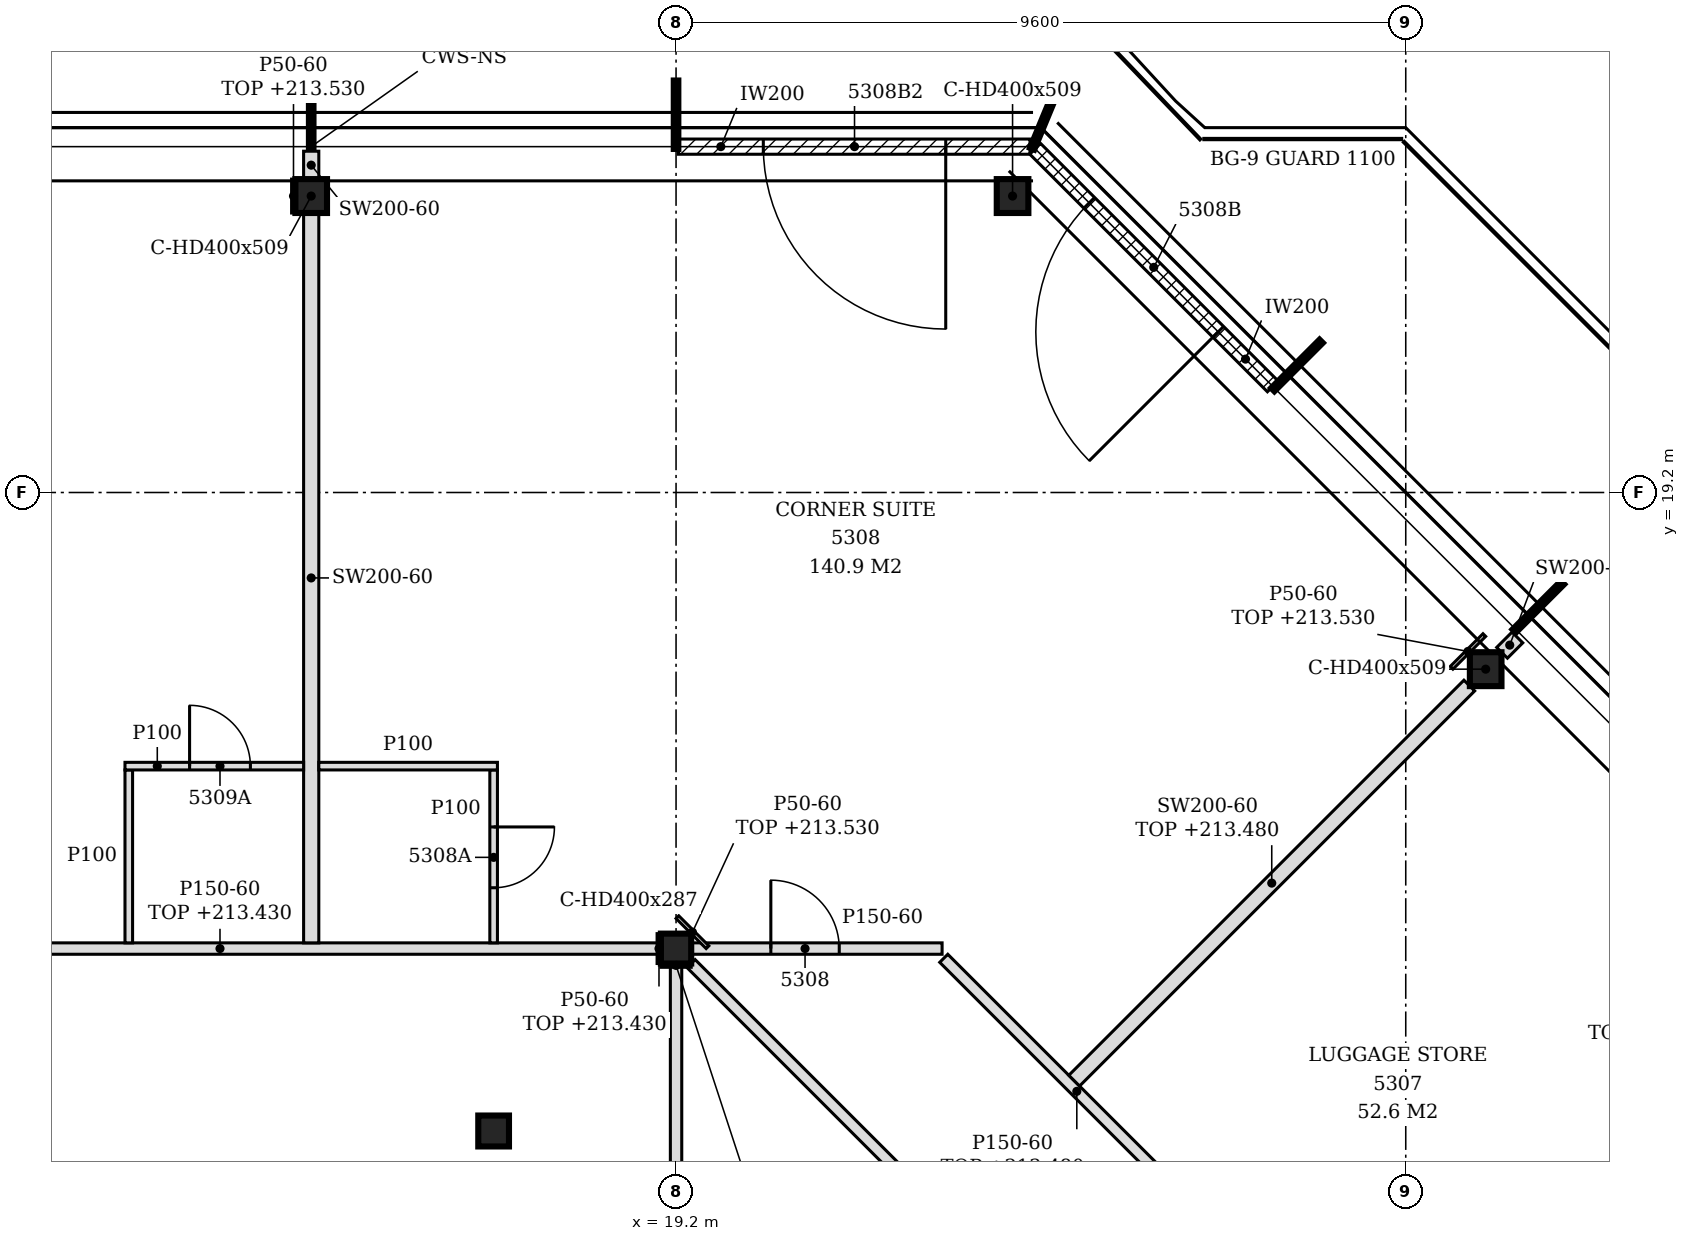
"""IFC4 building model, lengths in metres.
Left out: names, types, materials, properties, quantities, classifications, styles, units other than length and angle.
Written with IfcOpenShell. Run it as: python <this file> out.ifc"""

import sys

from ifc_helpers import new_model, si_unit, direction, frame, frame_2d, origin, origin_2d, place, context, subcontext, project, spatial, polyline, rectangle, i_section, outline, extrude, element, fill, save


model = new_model("IFC4")
c1 = context("Model", 3, precision=1e-05, world=origin(), true_north=direction((0.0, 1.0)))
c2 = subcontext(c1, "Body", "Model", "MODEL_VIEW")
j1 = project(units=[si_unit("LENGTHUNIT", "METRE"), si_unit("PLANEANGLEUNIT", "RADIAN")], contexts=[c1])
p1 = place(None, origin())
s1 = spatial("IfcSite", under=j1, at=p1, CompositionType="ELEMENT")
p2 = place(p1, origin())
s2 = spatial("IfcBuilding", under=s1, at=p2, CompositionType="ELEMENT")
p3 = place(p2, frame((0.0, 0.0, 210.6)))
s3 = spatial("IfcBuildingStorey", under=s2, at=p3, CompositionType="ELEMENT", Elevation=210.6)
for number, where, z_axis, x_axis in (
    (1, (29.852, 16.876, -0.15), (0.0, 0.0, 1.0), (1.0, 0.0, 0.0)),
    (2, (23.627, 23.1, -0.15), (0.0, 0.0, 1.0), (1.0, 0.0, 0.0)),
    (3, (14.4, 23.1, -0.15), (0.0, 0.0, 1.0), (1.0, 0.0, 0.0)),
):
    element("IfcColumn", number, at=place(p3, frame(where, z_axis=z_axis, x_axis=x_axis)), inside=s3, PredefinedType="COLUMN", context=c2, shape_type="SweptSolid", body=[
        extrude(i_section(OverallWidth=0.416, OverallDepth=0.446, WebThickness=0.039, FlangeThickness=0.063, FilletRadius=0.015, at=origin_2d()), origin(), (0.0, 0.0, 1.0), 3.6),
    ])
p4 = place(p3, frame((19.2, 13.2, -0.15), z_axis=(0.0, 0.0, 1.0), x_axis=(1.0, 0.0, 0.0)))
e4 = element("IfcColumn", 4, at=p4, inside=s3, PredefinedType="COLUMN", context=c2, shape_type="SweptSolid", body=[
    extrude(i_section(OverallWidth=0.399, OverallDepth=0.393, WebThickness=0.023, FlangeThickness=0.037, FilletRadius=0.015, at=origin_2d()), origin(), (0.0, 0.0, 1.0), 3.6),
])
p5 = place(p3, frame((16.8, 10.8, -0.15), z_axis=(0.0, 0.0, 1.0), x_axis=(1.0, 0.0, 0.0)))
e5 = element("IfcColumn", 5, at=p5, inside=s3, PredefinedType="COLUMN", context=c2, shape_type="SweptSolid", body=[
    extrude(i_section(OverallWidth=0.404, OverallDepth=0.407, WebThickness=0.027, FlangeThickness=0.044, FilletRadius=0.015, at=origin_2d()), origin(), (0.0, 0.0, 1.0), 3.6),
])
p6 = place(p3, frame((27.051, 20.596, 0.0), z_axis=(0.0, 0.0, 1.0), x_axis=(-0.707106781187, 0.707106781187, 0.0)))
e6 = element("IfcWall", 6, at=p6, inside=s3, PredefinedType="NOTDEFINED", context=c2, shape_type="SweptSolid", body=[
    extrude(rectangle(XDim=4.421, YDim=0.2, at=frame_2d((2.21, 0.0))), origin(), (0.0, 0.0, 1.0), 3.45),
])
p7 = place(p6, frame((1.015, 0.0, 0.0)))
e7 = element("IfcOpeningElement", 7, at=p7, cuts=e6, PredefinedType="OPENING", context=c2, shape_type="SweptSolid", body=[
    extrude(rectangle(XDim=2.4, YDim=2.4, at=frame_2d((1.2, 1.2))), frame((0.0, 0.11, 0.0), z_axis=(0.0, -1.0, 0.0), x_axis=(1.0, 0.0, 0.0)), (0.0, 0.0, 1.0), 0.22),
])
p8 = place(p3, frame((23.856, 23.75, 0.0), z_axis=(0.0, 0.0, 1.0), x_axis=(-1.0, 0.0, 0.0)))
e8 = element("IfcWall", 8, at=p8, inside=s3, PredefinedType="NOTDEFINED", context=c2, shape_type="SweptSolid", body=[
    extrude(rectangle(XDim=4.626, YDim=0.2, at=frame_2d((2.313, 0.0))), origin(), (0.0, 0.0, 1.0), 3.45),
])
p9 = place(p8, frame((1.108, 0.0, 0.0)))
e9 = element("IfcOpeningElement", 9, at=p9, cuts=e8, PredefinedType="OPENING", context=c2, shape_type="SweptSolid", body=[
    extrude(rectangle(XDim=2.4, YDim=2.4, at=frame_2d((1.2, 1.2))), frame((0.0, 0.11, 0.0), z_axis=(0.0, -1.0, 0.0), x_axis=(1.0, 0.0, 0.0)), (0.0, 0.0, 1.0), 0.22),
])
p10 = place(p3, frame((35.872, -0.078, 0.0), z_axis=(0.0, 0.0, 1.0), x_axis=(-0.707113345155, 0.707100217157, 0.0)))
e10 = element("IfcWall", 10, at=p10, inside=s3, PredefinedType="PARTITIONING", context=c2, shape_type="SweptSolid", body=[
    extrude(rectangle(XDim=18.597, YDim=0.15, at=frame_2d((9.298, 0.0))), origin(), (0.0, 0.0, 1.0), 2.88),
])
p11 = place(p10, frame((4.744, 0.0, 0.0)))
e11 = element("IfcOpeningElement", 11, at=p11, cuts=e10, PredefinedType="OPENING", context=c2, shape_type="SweptSolid", body=[
    extrude(rectangle(XDim=0.9, YDim=2.1, at=frame_2d((0.45, 1.05))), frame((0.0, 0.085, 0.0), z_axis=(0.0, -1.0, 0.0), x_axis=(1.0, 0.0, 0.0)), (0.0, 0.0, 1.0), 0.17),
])
p12 = place(p10, frame((8.345, 0.0, 0.0)))
e12 = element("IfcOpeningElement", 12, at=p12, cuts=e10, PredefinedType="OPENING", context=c2, shape_type="SweptSolid", body=[
    extrude(rectangle(XDim=0.9, YDim=2.1, at=frame_2d((0.45, 1.05))), frame((0.0, 0.085, 0.0), z_axis=(0.0, -1.0, 0.0), x_axis=(1.0, 0.0, 0.0)), (0.0, 0.0, 1.0), 0.17),
])
p13 = place(p10, frame((12.746, 0.0, 0.0)))
e13 = element("IfcOpeningElement", 13, at=p13, cuts=e10, PredefinedType="OPENING", context=c2, shape_type="SweptSolid", body=[
    extrude(rectangle(XDim=0.9, YDim=2.1, at=frame_2d((0.45, 1.05))), frame((0.0, 0.085, 0.0), z_axis=(0.0, -1.0, 0.0), x_axis=(1.0, 0.0, 0.0)), (0.0, 0.0, 1.0), 0.17),
])
p14 = place(p3, frame((32.272, 0.128, 0.0), z_axis=(0.0, 0.0, 1.0), x_axis=(-0.707106781187, 0.707106781187, 0.0)))
e14 = element("IfcWall", 14, at=p14, inside=s3, PredefinedType="PARTITIONING", context=c2, shape_type="SweptSolid", body=[
    extrude(rectangle(XDim=18.207, YDim=0.15, at=frame_2d((9.103, 0.0))), origin(), (0.0, 0.0, 1.0), 2.88),
])
p15 = place(p14, frame((8.703, 0.0, 0.0)))
e15 = element("IfcOpeningElement", 15, at=p15, cuts=e14, PredefinedType="OPENING", context=c2, shape_type="SweptSolid", body=[
    extrude(rectangle(XDim=0.9, YDim=2.1, at=frame_2d((0.45, 1.05))), frame((0.0, 0.085, 0.0), z_axis=(0.0, -1.0, 0.0), x_axis=(1.0, 0.0, 0.0)), (0.0, 0.0, 1.0), 0.17),
])
p16 = place(p3, frame((19.2, 2.596, 0.0), z_axis=(0.0, 0.0, 1.0), x_axis=(0.0, 1.0, 0.0)))
e16 = element("IfcWall", 16, at=p16, inside=s3, PredefinedType="PARTITIONING", context=c2, shape_type="SweptSolid", body=[
    extrude(rectangle(XDim=10.407, YDim=0.15, at=frame_2d((5.204, 0.0))), origin(), (0.0, 0.0, 1.0), 2.83),
])
p17 = place(p3, frame((30.662, 5.238, 0.0), z_axis=(0.0, 0.0, 1.0), x_axis=(0.707106781187, 0.707106781187, 0.0)))
e17 = element("IfcWall", 17, at=p17, inside=s3, PredefinedType="PARTITIONING", context=c2, shape_type="SweptSolid", body=[
    extrude(rectangle(XDim=7.351, YDim=0.2, at=frame_2d((3.676, 0.0))), origin(), (0.0, 0.0, 1.0), 2.93),
])
p18 = place(p3, frame((31.398, 9.798, 0.0), z_axis=(0.0, 0.0, 1.0), x_axis=(0.707133900936, 0.707079660397, 0.0)))
e18 = element("IfcWall", 18, at=p18, inside=s3, PredefinedType="PARTITIONING", context=c2, shape_type="SweptSolid", body=[
    extrude(rectangle(XDim=4.501, YDim=0.2, at=frame_2d((2.25, 0.0))), origin(), (0.0, 0.0, 1.0), 2.63),
])
p19 = place(p3, frame((24.438, 11.462, 0.0), z_axis=(0.0, 0.0, 1.0), x_axis=(0.707090175614, 0.707123386369, 0.0)))
e19 = element("IfcWall", 19, at=p19, inside=s3, PredefinedType="PARTITIONING", context=c2, shape_type="SweptSolid", body=[
    extrude(rectangle(XDim=7.351, YDim=0.2, at=frame_2d((3.676, 0.0))), origin(), (0.0, 0.0, 1.0), 2.88),
])
p20 = place(p3, frame((7.399, 13.2, 0.0), z_axis=(0.0, 0.0, 1.0), x_axis=(1.0, 0.0, 0.0)))
e20 = element("IfcWall", 20, at=p20, inside=s3, PredefinedType="PARTITIONING", context=c2, shape_type="SweptSolid", body=[
    extrude(rectangle(XDim=11.601, YDim=0.15, at=frame_2d((5.801, 0.0))), origin(), (0.0, 0.0, 1.0), 2.83),
])
p21 = place(p3, frame((19.399, 13.2, 0.0), z_axis=(0.0, 0.0, 1.0), x_axis=(1.0, 0.0, 0.0)))
e21 = element("IfcWall", 21, at=p21, inside=s3, PredefinedType="PARTITIONING", context=c2, shape_type="SweptSolid", body=[
    extrude(rectangle(XDim=3.301, YDim=0.15, at=frame_2d((1.65, 0.0))), origin(), (0.0, 0.0, 1.0), 3.45),
])
p22 = place(p21, frame((1.048, 0.0, 0.0)))
e22 = element("IfcOpeningElement", 22, at=p22, cuts=e21, PredefinedType="OPENING", context=c2, shape_type="SweptSolid", body=[
    extrude(rectangle(XDim=0.9, YDim=2.1, at=frame_2d((0.45, 1.05))), frame((0.0, 0.085, 0.0), z_axis=(0.0, -1.0, 0.0), x_axis=(1.0, 0.0, 0.0)), (0.0, 0.0, 1.0), 0.17),
])
p23 = place(p3, frame((12.0, 13.275, 0.0), z_axis=(0.0, 0.0, 1.0), x_axis=(0.0, 1.0, 0.0)))
e23 = element("IfcWall", 23, at=p23, inside=s3, PredefinedType="PARTITIONING", context=c2, shape_type="SweptSolid", body=[
    extrude(outline(polyline([(0.0, 0.0), (2.275, 0.0), (2.275, 3.45), (0.075, 3.45), (0.073, 2.83), (0.0, 2.83), (0.0, 0.0)])), frame((0.0, 0.05, 0.0), z_axis=(0.0, -1.0, 0.0), x_axis=(1.0, 0.0, 0.0)), (0.0, 0.0, 1.0), 0.1),
])
p24 = place(p3, frame((14.4, 13.275, 0.0), z_axis=(0.0, 0.0, 1.0), x_axis=(0.0, 1.0, 0.0)))
e24 = element("IfcWall", 24, at=p24, inside=s3, PredefinedType="PARTITIONING", context=c2, shape_type="SweptSolid", body=[
    extrude(outline(polyline([(0.0, 0.0), (9.602, 0.0), (9.602, 3.45), (6.03, 3.45), (6.028, 2.88), (5.82, 2.88), (5.818, 3.45), (0.075, 3.45), (0.073, 2.83), (0.0, 2.83), (0.0, 0.0)])), frame((0.0, 0.1, 0.0), z_axis=(0.0, -1.0, 0.0), x_axis=(1.0, 0.0, 0.0)), (0.0, 0.0, 1.0), 0.2),
])
p25 = place(p3, frame((16.8, 13.275, 0.0), z_axis=(0.0, 0.0, 1.0), x_axis=(0.0, 1.0, 0.0)))
e25 = element("IfcWall", 25, at=p25, inside=s3, PredefinedType="PARTITIONING", context=c2, shape_type="SweptSolid", body=[
    extrude(outline(polyline([(0.0, 0.0), (2.275, 0.0), (2.275, 3.45), (0.075, 3.45), (0.073, 2.83), (0.0, 2.83), (0.0, 0.0)])), frame((0.0, 0.05, 0.0), z_axis=(0.0, -1.0, 0.0), x_axis=(1.0, 0.0, 0.0)), (0.0, 0.0, 1.0), 0.1),
])
p26 = place(p25, frame((0.725, 0.0, 0.0)))
e26 = element("IfcOpeningElement", 26, at=p26, cuts=e25, PredefinedType="OPENING", context=c2, shape_type="SweptSolid", body=[
    extrude(rectangle(XDim=0.8, YDim=2.1, at=frame_2d((0.4, 1.05))), frame((0.0, 0.06, 0.0), z_axis=(0.0, -1.0, 0.0), x_axis=(1.0, 0.0, 0.0)), (0.0, 0.0, 1.0), 0.12),
])
p27 = place(p3, frame((11.95, 15.6, 0.0), z_axis=(0.0, 0.0, 1.0), x_axis=(1.0, 0.0, 0.0)))
e27 = element("IfcWall", 27, at=p27, inside=s3, PredefinedType="PARTITIONING", context=c2, shape_type="SweptSolid", body=[
    extrude(rectangle(XDim=2.35, YDim=0.1, at=frame_2d((1.175, 0.0))), origin(), (0.0, 0.0, 1.0), 3.45),
])
p28 = place(p27, frame((0.85, 0.0, 0.0)))
e28 = element("IfcOpeningElement", 28, at=p28, cuts=e27, PredefinedType="OPENING", context=c2, shape_type="SweptSolid", body=[
    extrude(rectangle(XDim=0.8, YDim=2.1, at=frame_2d((0.4, 1.05))), frame((0.0, 0.06, 0.0), z_axis=(0.0, -1.0, 0.0), x_axis=(1.0, 0.0, 0.0)), (0.0, 0.0, 1.0), 0.12),
])
p29 = place(p3, frame((14.5, 15.6, 0.0), z_axis=(0.0, 0.0, 1.0), x_axis=(1.0, 0.0, 0.0)))
e29 = element("IfcWall", 29, at=p29, inside=s3, PredefinedType="PARTITIONING", context=c2, shape_type="SweptSolid", body=[
    extrude(rectangle(XDim=2.35, YDim=0.1, at=frame_2d((1.175, 0.0))), origin(), (0.0, 0.0, 1.0), 3.45),
])
p30 = place(p3, frame((30.067, 17.091, 0.0), z_axis=(0.0, 0.0, 1.0), x_axis=(0.707106781187, 0.707106781187, 0.0)))
e30 = element("IfcWall", 30, at=p30, inside=s3, PredefinedType="PARTITIONING", context=c2, shape_type="SweptSolid", body=[
    extrude(rectangle(XDim=0.285, YDim=0.2, at=frame_2d((0.143, 0.0))), origin(), (0.0, 0.0, 1.0), 3.45),
])
p31 = place(p3, frame((14.4, 23.323, 0.0), z_axis=(0.0, 0.0, 1.0), x_axis=(0.0, 1.0, 0.0)))
e31 = element("IfcWall", 31, at=p31, inside=s3, PredefinedType="PARTITIONING", context=c2, shape_type="SweptSolid", body=[
    extrude(rectangle(XDim=0.367, YDim=0.2, at=frame_2d((0.184, 0.0))), origin(), (0.0, 0.0, 1.0), 3.45),
])
p32 = place(p3, frame((18.976, 13.003, 0.0), z_axis=(0.0, 0.0, 1.0), x_axis=(0.0, 1.0, 0.0)))
e32 = element("IfcWall", 32, at=p32, inside=s3, PredefinedType="PARTITIONING", context=c2, shape_type="SweptSolid", body=[
    extrude(rectangle(XDim=0.393, YDim=0.05, at=frame_2d((0.197, 0.0))), origin(), (0.0, 0.0, 1.0), 2.83),
])
p33 = place(p3, frame((19.614, 13.218, 0.0), z_axis=(0.0, 0.0, 1.0), x_axis=(-0.707106781187, 0.707106781187, 0.0)))
e33 = element("IfcWall", 33, at=p33, inside=s3, PredefinedType="PARTITIONING", context=c2, shape_type="SweptSolid", body=[
    extrude(rectangle(XDim=0.56, YDim=0.05, at=frame_2d((0.28, 0.0))), origin(), (0.0, 0.0, 1.0), 2.93),
])
p34 = place(p3, frame((29.403, 16.893, 0.0), z_axis=(0.0, 0.0, 1.0), x_axis=(0.706906496032, 0.707307009627, 0.0)))
e34 = element("IfcWall", 34, at=p34, inside=s3, PredefinedType="PARTITIONING", context=c2, shape_type="SweptSolid", body=[
    extrude(rectangle(XDim=0.61, YDim=0.05, at=frame_2d((0.305, 0.0))), origin(), (0.0, 0.0, 1.0), 2.93),
])
p35 = place(p3, frame((19.0, 12.979, 0.0), z_axis=(0.0, 0.0, 1.0), x_axis=(1.0, 0.0, 0.0)))
e35 = element("IfcWall", 35, at=p35, inside=s3, PredefinedType="PARTITIONING", context=c2, shape_type="SweptSolid", body=[
    extrude(rectangle(XDim=0.399, YDim=0.05, at=frame_2d((0.199, 0.0))), origin(), (0.0, 0.0, 1.0), 2.83),
])
p36 = place(p3, frame((14.167, 22.877, 0.0), z_axis=(0.0, 0.0, 1.0), x_axis=(0.0, 1.0, 0.0)))
e36 = element("IfcWall", 36, at=p36, inside=s3, PredefinedType="PARTITIONING", context=c2, shape_type="SweptSolid", body=[
    extrude(rectangle(XDim=0.446, YDim=0.05, at=frame_2d((0.223, 0.0))), origin(), (0.0, 0.0, 1.0), 2.93),
])
p37 = place(p7, origin())
e37 = element("IfcDoor", 37, at=p37, inside=s3, OperationType="SINGLE_SWING_LEFT", PredefinedType="DOOR", context=c2, shape_type="SweptSolid", body=[
    extrude(rectangle(XDim=2.4, YDim=2.4, at=frame_2d((1.2, 1.2))), frame((0.0, 0.025, 0.0), z_axis=(0.0, -1.0, 0.0), x_axis=(1.0, 0.0, 0.0)), (0.0, 0.0, 1.0), 0.05),
])
fill(e7, e37)
p38 = place(p9, origin())
e38 = element("IfcDoor", 38, at=p38, inside=s3, OperationType="SINGLE_SWING_LEFT", PredefinedType="DOOR", context=c2, shape_type="SweptSolid", body=[
    extrude(rectangle(XDim=2.4, YDim=2.4, at=frame_2d((1.2, 1.2))), frame((0.0, 0.025, 0.0), z_axis=(0.0, -1.0, 0.0), x_axis=(1.0, 0.0, 0.0)), (0.0, 0.0, 1.0), 0.05),
])
fill(e9, e38)
p39 = place(p22, origin())
e39 = element("IfcDoor", 39, at=p39, inside=s3, OperationType="SINGLE_SWING_LEFT", PredefinedType="DOOR", context=c2, shape_type="SweptSolid", body=[
    extrude(rectangle(XDim=0.9, YDim=2.1, at=frame_2d((0.45, 1.05))), frame((0.0, 0.025, 0.0), z_axis=(0.0, -1.0, 0.0), x_axis=(1.0, 0.0, 0.0)), (0.0, 0.0, 1.0), 0.05),
])
fill(e22, e39)
p40 = place(p26, frame((0.8, 0.0, 0.0), z_axis=(0.0, 0.0, 1.0), x_axis=(-1.0, 0.0, 0.0)))
e40 = element("IfcDoor", 40, at=p40, inside=s3, OperationType="SINGLE_SWING_LEFT", PredefinedType="DOOR", context=c2, shape_type="SweptSolid", body=[
    extrude(rectangle(XDim=0.8, YDim=2.1, at=frame_2d((0.4, 1.05))), frame((0.0, 0.025, 0.0), z_axis=(0.0, -1.0, 0.0), x_axis=(1.0, 0.0, 0.0)), (0.0, 0.0, 1.0), 0.05),
])
fill(e26, e40)
p41 = place(p28, origin())
e41 = element("IfcDoor", 41, at=p41, inside=s3, OperationType="SINGLE_SWING_LEFT", PredefinedType="DOOR", context=c2, shape_type="SweptSolid", body=[
    extrude(rectangle(XDim=0.8, YDim=2.1, at=frame_2d((0.4, 1.05))), frame((0.0, 0.025, 0.0), z_axis=(0.0, -1.0, 0.0), x_axis=(1.0, 0.0, 0.0)), (0.0, 0.0, 1.0), 0.05),
])
fill(e28, e41)
save(model, sys.argv[1])
